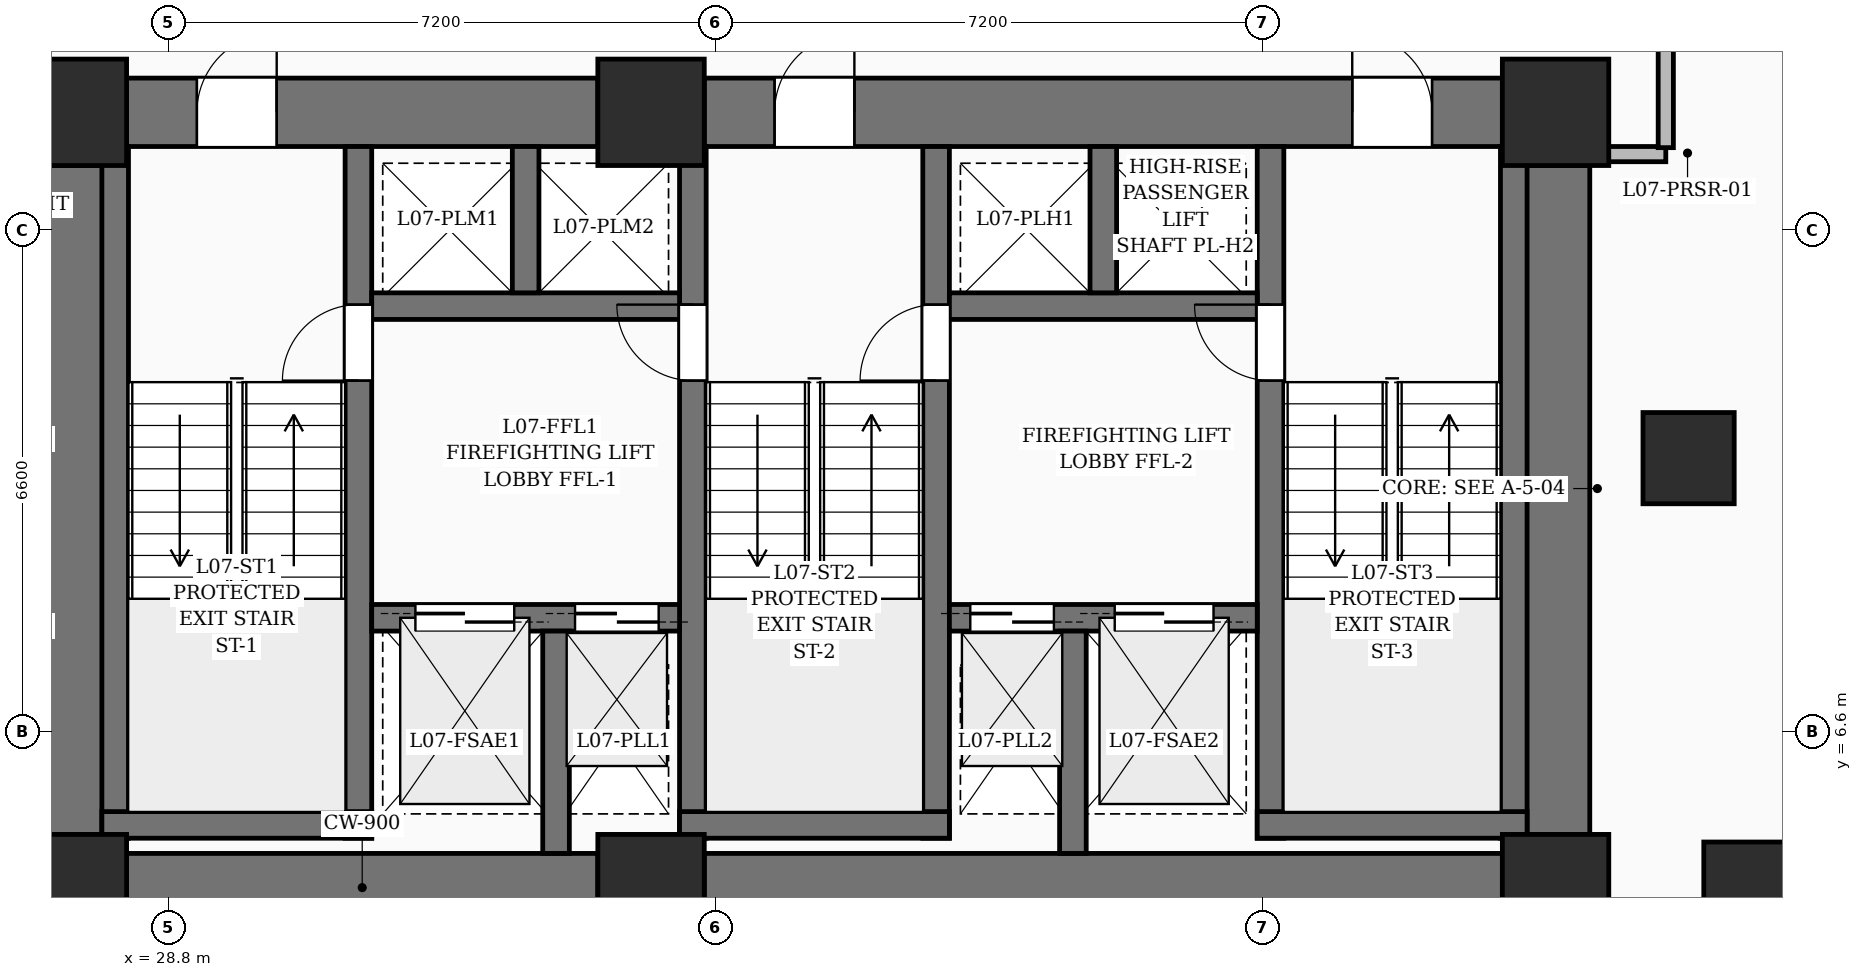
"""IFC4 building model, lengths in metres.
Left out: names, types, materials, properties, quantities, classifications, styles, units other than length and angle.
Written with IfcOpenShell. Run it as: python <this file> out.ifc"""

import sys

from ifc_helpers import new_model, si_unit, direction, frame, frame_2d, origin, origin_2d, place, context, subcontext, project, spatial, rectangle, extrude, element, fill, save


model = new_model("IFC4")
c1 = context("Model", 3, precision=1e-05, world=origin(), true_north=direction((0.0, 1.0)))
c2 = subcontext(c1, "Body", "Model", "MODEL_VIEW")
j1 = project(units=[si_unit("LENGTHUNIT", "METRE"), si_unit("PLANEANGLEUNIT", "RADIAN")], contexts=[c1])
p1 = place(None, origin())
s1 = spatial("IfcSite", under=j1, at=p1, CompositionType="ELEMENT")
p2 = place(p1, origin())
s2 = spatial("IfcBuilding", under=s1, at=p2, CompositionType="ELEMENT")
p3 = place(p2, frame((0.0, 0.0, 35.4)))
s3 = spatial("IfcBuildingStorey", under=s2, at=p3, CompositionType="ELEMENT", Elevation=35.4)
for number, where, z_axis, x_axis in (
    (1, (27.55, 4.55, 0.0), (0.0, 0.0, 1.0), (1.0, 0.0, 0.0)),
    (2, (35.15, 4.55, 0.0), (0.0, 0.0, 1.0), (1.0, 0.0, 0.0)),
    (3, (47.05, 4.55, 0.0), (0.0, 0.0, 1.0), (1.0, 0.0, 0.0)),
    (4, (27.55, 14.75, 0.0), (0.0, 0.0, 1.0), (1.0, 0.0, 0.0)),
    (5, (35.15, 14.75, 0.0), (0.0, 0.0, 1.0), (1.0, 0.0, 0.0)),
    (6, (47.05, 14.75, 0.0), (0.0, 0.0, 1.0), (1.0, 0.0, 0.0)),
):
    element("IfcColumn", number, at=place(p3, frame(where, z_axis=z_axis, x_axis=x_axis)), inside=s3, PredefinedType="COLUMN", context=c2, shape_type="SweptSolid", body=[
        extrude(rectangle(XDim=1.4, YDim=1.4, at=origin_2d()), origin(), (0.0, 0.0, 1.0), 3.6),
    ])
for number, where, z_axis, x_axis in (
    (7, (49.6, 4.55, 0.0), (0.0, 0.0, 1.0), (1.0, 0.0, 0.0)),
    (8, (48.8, 10.2, 0.0), (0.0, 0.0, 1.0), (1.0, 0.0, 0.0)),
):
    element("IfcColumn", number, at=place(p3, frame(where, z_axis=z_axis, x_axis=x_axis)), inside=s3, PredefinedType="COLUMN", context=c2, shape_type="SweptSolid", body=[
        extrude(rectangle(XDim=1.2, YDim=1.2, at=origin_2d()), origin(), (0.0, 0.0, 1.0), 3.6),
    ])
p4 = place(p3, frame((28.25, 4.55, 0.0), z_axis=(0.0, 0.0, 1.0), x_axis=(1.0, 0.0, 0.0)))
e9 = element("IfcWall", 9, at=p4, inside=s3, PredefinedType="SHEAR", context=c2, shape_type="SweptSolid", body=[
    extrude(rectangle(XDim=6.2, YDim=0.9, at=frame_2d((3.1, 0.0))), origin(), (0.0, 0.0, 1.0), 3.6),
])
p5 = place(p3, frame((35.85, 4.55, 0.0), z_axis=(0.0, 0.0, 1.0), x_axis=(1.0, 0.0, 0.0)))
e10 = element("IfcWall", 10, at=p5, inside=s3, PredefinedType="SHEAR", context=c2, shape_type="SweptSolid", body=[
    extrude(rectangle(XDim=10.5, YDim=0.9, at=frame_2d((5.25, 0.0))), origin(), (0.0, 0.0, 1.0), 3.6),
])
p6 = place(p3, frame((28.25, 14.75, 0.0), z_axis=(0.0, 0.0, 1.0), x_axis=(1.0, 0.0, 0.0)))
e11 = element("IfcWall", 11, at=p6, inside=s3, PredefinedType="SHEAR", context=c2, shape_type="SweptSolid", body=[
    extrude(rectangle(XDim=6.2, YDim=0.9, at=frame_2d((3.1, 0.0))), origin(), (0.0, 0.0, 1.0), 3.6),
])
p7 = place(p6, frame((0.925, 0.0, 0.0)))
e12 = element("IfcOpeningElement", 12, at=p7, cuts=e11, PredefinedType="OPENING", context=c2, shape_type="SweptSolid", body=[
    extrude(rectangle(XDim=1.05, YDim=2.15, at=frame_2d((0.525, 1.075))), frame((0.0, 0.46, 0.0), z_axis=(0.0, -1.0, 0.0), x_axis=(1.0, 0.0, 0.0)), (0.0, 0.0, 1.0), 0.92),
])
p8 = place(p3, frame((35.85, 14.75, 0.0), z_axis=(0.0, 0.0, 1.0), x_axis=(1.0, 0.0, 0.0)))
e13 = element("IfcWall", 13, at=p8, inside=s3, PredefinedType="SHEAR", context=c2, shape_type="SweptSolid", body=[
    extrude(rectangle(XDim=10.5, YDim=0.9, at=frame_2d((5.25, 0.0))), origin(), (0.0, 0.0, 1.0), 3.6),
])
p9 = place(p8, frame((0.925, 0.0, 0.0)))
e14 = element("IfcOpeningElement", 14, at=p9, cuts=e13, PredefinedType="OPENING", context=c2, shape_type="SweptSolid", body=[
    extrude(rectangle(XDim=1.05, YDim=2.15, at=frame_2d((0.525, 1.075))), frame((0.0, 0.46, 0.0), z_axis=(0.0, -1.0, 0.0), x_axis=(1.0, 0.0, 0.0)), (0.0, 0.0, 1.0), 0.92),
])
p10 = place(p8, frame((8.525, 0.0, 0.0)))
e15 = element("IfcOpeningElement", 15, at=p10, cuts=e13, PredefinedType="OPENING", context=c2, shape_type="SweptSolid", body=[
    extrude(rectangle(XDim=1.05, YDim=2.15, at=frame_2d((0.525, 1.075))), frame((0.0, 0.46, 0.0), z_axis=(0.0, -1.0, 0.0), x_axis=(1.0, 0.0, 0.0)), (0.0, 0.0, 1.0), 0.92),
])
for number, where, z_axis, x_axis in (
    (16, (27.55, 5.25, 0.0), (0.0, 0.0, 1.0), (0.0, 1.0, 0.0)),
    (17, (47.05, 5.25, 0.0), (0.0, 0.0, 1.0), (0.0, 1.0, 0.0)),
):
    element("IfcWall", number, at=place(p3, frame(where, z_axis=z_axis, x_axis=x_axis)), inside=s3, PredefinedType="SHEAR", context=c2, shape_type="SweptSolid", body=[
        extrude(rectangle(XDim=8.8, YDim=0.9, at=frame_2d((4.4, 0.0))), origin(), (0.0, 0.0, 1.0), 3.6),
    ])
p11 = place(p3, frame((28.1, 5.2, 0.0), z_axis=(0.0, 0.0, 1.0), x_axis=(0.0, 1.0, 0.0)))
e18 = element("IfcWall", 18, at=p11, inside=s3, PredefinedType="SOLIDWALL", context=c2, shape_type="SweptSolid", body=[
    extrude(rectangle(XDim=9.1, YDim=0.35, at=frame_2d((4.55, 0.0))), origin(), (0.0, 0.0, 1.0), 3.6),
])
p12 = place(p3, frame((31.3, 5.2, 0.0), z_axis=(0.0, 0.0, 1.0), x_axis=(0.0, 1.0, 0.0)))
e19 = element("IfcWall", 19, at=p12, inside=s3, PredefinedType="SOLIDWALL", context=c2, shape_type="SweptSolid", body=[
    extrude(rectangle(XDim=9.1, YDim=0.35, at=frame_2d((4.55, 0.0))), origin(), (0.0, 0.0, 1.0), 3.6),
])
p13 = place(p12, frame((6.02, 0.0, 0.0)))
e20 = element("IfcOpeningElement", 20, at=p13, cuts=e19, PredefinedType="OPENING", context=c2, shape_type="SweptSolid", body=[
    extrude(rectangle(XDim=1.0, YDim=2.15, at=frame_2d((0.5, 1.075))), frame((0.0, 0.185, 0.0), z_axis=(0.0, -1.0, 0.0), x_axis=(1.0, 0.0, 0.0)), (0.0, 0.0, 1.0), 0.37),
])
p14 = place(p3, frame((27.925, 5.375, 0.0), z_axis=(0.0, 0.0, 1.0), x_axis=(1.0, 0.0, 0.0)))
e21 = element("IfcWall", 21, at=p14, inside=s3, PredefinedType="SOLIDWALL", context=c2, shape_type="SweptSolid", body=[
    extrude(rectangle(XDim=3.55, YDim=0.35, at=frame_2d((1.775, 0.0))), origin(), (0.0, 0.0, 1.0), 3.6),
])
p15 = place(p3, frame((35.7, 5.2, 0.0), z_axis=(0.0, 0.0, 1.0), x_axis=(0.0, 1.0, 0.0)))
e22 = element("IfcWall", 22, at=p15, inside=s3, PredefinedType="SOLIDWALL", context=c2, shape_type="SweptSolid", body=[
    extrude(rectangle(XDim=9.1, YDim=0.35, at=frame_2d((4.55, 0.0))), origin(), (0.0, 0.0, 1.0), 3.6),
])
p16 = place(p15, frame((6.02, 0.0, 0.0)))
e23 = element("IfcOpeningElement", 23, at=p16, cuts=e22, PredefinedType="OPENING", context=c2, shape_type="SweptSolid", body=[
    extrude(rectangle(XDim=1.0, YDim=2.15, at=frame_2d((0.5, 1.075))), frame((0.0, 0.185, 0.0), z_axis=(0.0, -1.0, 0.0), x_axis=(1.0, 0.0, 0.0)), (0.0, 0.0, 1.0), 0.37),
])
p17 = place(p3, frame((38.9, 5.2, 0.0), z_axis=(0.0, 0.0, 1.0), x_axis=(0.0, 1.0, 0.0)))
e24 = element("IfcWall", 24, at=p17, inside=s3, PredefinedType="SOLIDWALL", context=c2, shape_type="SweptSolid", body=[
    extrude(rectangle(XDim=9.1, YDim=0.35, at=frame_2d((4.55, 0.0))), origin(), (0.0, 0.0, 1.0), 3.6),
])
p18 = place(p17, frame((6.02, 0.0, 0.0)))
e25 = element("IfcOpeningElement", 25, at=p18, cuts=e24, PredefinedType="OPENING", context=c2, shape_type="SweptSolid", body=[
    extrude(rectangle(XDim=1.0, YDim=2.15, at=frame_2d((0.5, 1.075))), frame((0.0, 0.185, 0.0), z_axis=(0.0, -1.0, 0.0), x_axis=(1.0, 0.0, 0.0)), (0.0, 0.0, 1.0), 0.37),
])
p19 = place(p3, frame((35.525, 5.375, 0.0), z_axis=(0.0, 0.0, 1.0), x_axis=(1.0, 0.0, 0.0)))
e26 = element("IfcWall", 26, at=p19, inside=s3, PredefinedType="SOLIDWALL", context=c2, shape_type="SweptSolid", body=[
    extrude(rectangle(XDim=3.55, YDim=0.35, at=frame_2d((1.775, 0.0))), origin(), (0.0, 0.0, 1.0), 3.6),
])
p20 = place(p3, frame((43.3, 5.2, 0.0), z_axis=(0.0, 0.0, 1.0), x_axis=(0.0, 1.0, 0.0)))
e27 = element("IfcWall", 27, at=p20, inside=s3, PredefinedType="SOLIDWALL", context=c2, shape_type="SweptSolid", body=[
    extrude(rectangle(XDim=9.1, YDim=0.35, at=frame_2d((4.55, 0.0))), origin(), (0.0, 0.0, 1.0), 3.6),
])
p21 = place(p20, frame((6.02, 0.0, 0.0)))
e28 = element("IfcOpeningElement", 28, at=p21, cuts=e27, PredefinedType="OPENING", context=c2, shape_type="SweptSolid", body=[
    extrude(rectangle(XDim=1.0, YDim=2.15, at=frame_2d((0.5, 1.075))), frame((0.0, 0.185, 0.0), z_axis=(0.0, -1.0, 0.0), x_axis=(1.0, 0.0, 0.0)), (0.0, 0.0, 1.0), 0.37),
])
p22 = place(p3, frame((46.5, 5.2, 0.0), z_axis=(0.0, 0.0, 1.0), x_axis=(0.0, 1.0, 0.0)))
e29 = element("IfcWall", 29, at=p22, inside=s3, PredefinedType="SOLIDWALL", context=c2, shape_type="SweptSolid", body=[
    extrude(rectangle(XDim=9.1, YDim=0.35, at=frame_2d((4.55, 0.0))), origin(), (0.0, 0.0, 1.0), 3.6),
])
p23 = place(p3, frame((43.125, 5.375, 0.0), z_axis=(0.0, 0.0, 1.0), x_axis=(1.0, 0.0, 0.0)))
e30 = element("IfcWall", 30, at=p23, inside=s3, PredefinedType="SOLIDWALL", context=c2, shape_type="SweptSolid", body=[
    extrude(rectangle(XDim=3.55, YDim=0.35, at=frame_2d((1.775, 0.0))), origin(), (0.0, 0.0, 1.0), 3.6),
])
p24 = place(p3, frame((31.475, 8.1, 0.0), z_axis=(0.0, 0.0, 1.0), x_axis=(1.0, 0.0, 0.0)))
e31 = element("IfcWall", 31, at=p24, inside=s3, PredefinedType="SOLIDWALL", context=c2, shape_type="SweptSolid", body=[
    extrude(rectangle(XDim=4.05, YDim=0.35, at=frame_2d((2.025, 0.0))), origin(), (0.0, 0.0, 1.0), 3.6),
])
p25 = place(p24, frame((0.575, 0.0, 0.0)))
e32 = element("IfcOpeningElement", 32, at=p25, cuts=e31, PredefinedType="OPENING", context=c2, shape_type="SweptSolid", body=[
    extrude(rectangle(XDim=1.3, YDim=2.25, at=frame_2d((0.65, 1.125))), frame((0.0, 0.185, 0.0), z_axis=(0.0, -1.0, 0.0), x_axis=(1.0, 0.0, 0.0)), (0.0, 0.0, 1.0), 0.37),
])
p26 = place(p24, frame((2.675, 0.0, 0.0)))
e33 = element("IfcOpeningElement", 33, at=p26, cuts=e31, PredefinedType="OPENING", context=c2, shape_type="SweptSolid", body=[
    extrude(rectangle(XDim=1.1, YDim=2.2, at=frame_2d((0.55, 1.1))), frame((0.0, 0.185, 0.0), z_axis=(0.0, -1.0, 0.0), x_axis=(1.0, 0.0, 0.0)), (0.0, 0.0, 1.0), 0.37),
])
p27 = place(p3, frame((39.075, 8.1, 0.0), z_axis=(0.0, 0.0, 1.0), x_axis=(1.0, 0.0, 0.0)))
e34 = element("IfcWall", 34, at=p27, inside=s3, PredefinedType="SOLIDWALL", context=c2, shape_type="SweptSolid", body=[
    extrude(rectangle(XDim=4.05, YDim=0.35, at=frame_2d((2.025, 0.0))), origin(), (0.0, 0.0, 1.0), 3.6),
])
p28 = place(p27, frame((2.175, 0.0, 0.0)))
e35 = element("IfcOpeningElement", 35, at=p28, cuts=e34, PredefinedType="OPENING", context=c2, shape_type="SweptSolid", body=[
    extrude(rectangle(XDim=1.3, YDim=2.25, at=frame_2d((0.65, 1.125))), frame((0.0, 0.185, 0.0), z_axis=(0.0, -1.0, 0.0), x_axis=(1.0, 0.0, 0.0)), (0.0, 0.0, 1.0), 0.37),
])
p29 = place(p27, frame((0.275, 0.0, 0.0)))
e36 = element("IfcOpeningElement", 36, at=p29, cuts=e34, PredefinedType="OPENING", context=c2, shape_type="SweptSolid", body=[
    extrude(rectangle(XDim=1.1, YDim=2.2, at=frame_2d((0.55, 1.1))), frame((0.0, 0.185, 0.0), z_axis=(0.0, -1.0, 0.0), x_axis=(1.0, 0.0, 0.0)), (0.0, 0.0, 1.0), 0.37),
])
for number, where, z_axis, x_axis in (
    (37, (33.9, 5.0, 0.0), (0.0, 0.0, 1.0), (0.0, 1.0, 0.0)),
    (38, (40.7, 5.0, 0.0), (0.0, 0.0, 1.0), (0.0, 1.0, 0.0)),
):
    element("IfcWall", number, at=place(p3, frame(where, z_axis=z_axis, x_axis=x_axis)), inside=s3, PredefinedType="SOLIDWALL", context=c2, shape_type="SweptSolid", body=[
        extrude(rectangle(XDim=2.925, YDim=0.35, at=frame_2d((1.462, 0.0))), origin(), (0.0, 0.0, 1.0), 3.6),
    ])
p30 = place(p3, frame((31.475, 12.2, 0.0), z_axis=(0.0, 0.0, 1.0), x_axis=(1.0, 0.0, 0.0)))
e39 = element("IfcWall", 39, at=p30, inside=s3, PredefinedType="SOLIDWALL", context=c2, shape_type="SweptSolid", body=[
    extrude(rectangle(XDim=4.05, YDim=0.35, at=frame_2d((2.025, 0.0))), origin(), (0.0, 0.0, 1.0), 3.6),
])
p31 = place(p3, frame((33.5, 12.375, 0.0), z_axis=(0.0, 0.0, 1.0), x_axis=(0.0, 1.0, 0.0)))
e40 = element("IfcWall", 40, at=p31, inside=s3, PredefinedType="SOLIDWALL", context=c2, shape_type="SweptSolid", body=[
    extrude(rectangle(XDim=1.925, YDim=0.35, at=frame_2d((0.962, 0.0))), origin(), (0.0, 0.0, 1.0), 3.6),
])
p32 = place(p3, frame((39.075, 12.2, 0.0), z_axis=(0.0, 0.0, 1.0), x_axis=(1.0, 0.0, 0.0)))
e41 = element("IfcWall", 41, at=p32, inside=s3, PredefinedType="SOLIDWALL", context=c2, shape_type="SweptSolid", body=[
    extrude(rectangle(XDim=4.05, YDim=0.35, at=frame_2d((2.025, 0.0))), origin(), (0.0, 0.0, 1.0), 3.6),
])
p33 = place(p3, frame((41.1, 12.375, 0.0), z_axis=(0.0, 0.0, 1.0), x_axis=(0.0, 1.0, 0.0)))
e42 = element("IfcWall", 42, at=p33, inside=s3, PredefinedType="SOLIDWALL", context=c2, shape_type="SweptSolid", body=[
    extrude(rectangle(XDim=1.925, YDim=0.35, at=frame_2d((0.962, 0.0))), origin(), (0.0, 0.0, 1.0), 3.6),
])
p34 = place(p3, frame((47.5, 14.2, 0.0), z_axis=(0.0, 0.0, 1.0), x_axis=(1.0, 0.0, 0.0)))
e43 = element("IfcWall", 43, at=p34, inside=s3, PredefinedType="PARTITIONING", context=c2, shape_type="SweptSolid", body=[
    extrude(rectangle(XDim=1.0, YDim=0.2, at=frame_2d((0.5, 0.0))), origin(), (0.0, 0.0, 1.0), 3.35),
])
p35 = place(p3, frame((48.5, 14.285, 0.0), z_axis=(0.0, 0.0, 1.0), x_axis=(0.0, 1.0, 0.0)))
e44 = element("IfcWall", 44, at=p35, inside=s3, PredefinedType="PARTITIONING", context=c2, shape_type="SweptSolid", body=[
    extrude(rectangle(XDim=3.38, YDim=0.2, at=frame_2d((1.69, 0.0))), origin(), (0.0, 0.0, 1.0), 2.228),
])
p36 = place(p7, origin())
e45 = element("IfcDoor", 45, at=p36, inside=s3, OperationType="SINGLE_SWING_RIGHT", PredefinedType="DOOR", context=c2, shape_type="SweptSolid", body=[
    extrude(rectangle(XDim=1.05, YDim=2.15, at=frame_2d((0.525, 1.075))), frame((0.0, 0.025, 0.0), z_axis=(0.0, -1.0, 0.0), x_axis=(1.0, 0.0, 0.0)), (0.0, 0.0, 1.0), 0.05),
])
fill(e12, e45)
p37 = place(p9, origin())
e46 = element("IfcDoor", 46, at=p37, inside=s3, OperationType="SINGLE_SWING_RIGHT", PredefinedType="DOOR", context=c2, shape_type="SweptSolid", body=[
    extrude(rectangle(XDim=1.05, YDim=2.15, at=frame_2d((0.525, 1.075))), frame((0.0, 0.025, 0.0), z_axis=(0.0, -1.0, 0.0), x_axis=(1.0, 0.0, 0.0)), (0.0, 0.0, 1.0), 0.05),
])
fill(e14, e46)
p38 = place(p10, origin())
e47 = element("IfcDoor", 47, at=p38, inside=s3, OperationType="SINGLE_SWING_LEFT", PredefinedType="DOOR", context=c2, shape_type="SweptSolid", body=[
    extrude(rectangle(XDim=1.05, YDim=2.15, at=frame_2d((0.525, 1.075))), frame((0.0, 0.025, 0.0), z_axis=(0.0, -1.0, 0.0), x_axis=(1.0, 0.0, 0.0)), (0.0, 0.0, 1.0), 0.05),
])
fill(e15, e47)
p39 = place(p13, origin())
e48 = element("IfcDoor", 48, at=p39, inside=s3, OperationType="SINGLE_SWING_LEFT", PredefinedType="DOOR", context=c2, shape_type="SweptSolid", body=[
    extrude(rectangle(XDim=1.0, YDim=2.15, at=frame_2d((0.5, 1.075))), frame((0.0, 0.025, 0.0), z_axis=(0.0, -1.0, 0.0), x_axis=(1.0, 0.0, 0.0)), (0.0, 0.0, 1.0), 0.05),
])
fill(e20, e48)
p40 = place(p16, origin())
e49 = element("IfcDoor", 49, at=p40, inside=s3, OperationType="SINGLE_SWING_RIGHT", PredefinedType="DOOR", context=c2, shape_type="SweptSolid", body=[
    extrude(rectangle(XDim=1.0, YDim=2.15, at=frame_2d((0.5, 1.075))), frame((0.0, 0.025, 0.0), z_axis=(0.0, -1.0, 0.0), x_axis=(1.0, 0.0, 0.0)), (0.0, 0.0, 1.0), 0.05),
])
fill(e23, e49)
p41 = place(p18, origin())
e50 = element("IfcDoor", 50, at=p41, inside=s3, OperationType="SINGLE_SWING_LEFT", PredefinedType="DOOR", context=c2, shape_type="SweptSolid", body=[
    extrude(rectangle(XDim=1.0, YDim=2.15, at=frame_2d((0.5, 1.075))), frame((0.0, 0.025, 0.0), z_axis=(0.0, -1.0, 0.0), x_axis=(1.0, 0.0, 0.0)), (0.0, 0.0, 1.0), 0.05),
])
fill(e25, e50)
p42 = place(p21, origin())
e51 = element("IfcDoor", 51, at=p42, inside=s3, OperationType="SINGLE_SWING_RIGHT", PredefinedType="DOOR", context=c2, shape_type="SweptSolid", body=[
    extrude(rectangle(XDim=1.0, YDim=2.15, at=frame_2d((0.5, 1.075))), frame((0.0, 0.025, 0.0), z_axis=(0.0, -1.0, 0.0), x_axis=(1.0, 0.0, 0.0)), (0.0, 0.0, 1.0), 0.05),
])
fill(e28, e51)
p43 = place(p25, origin())
e52 = element("IfcDoor", 52, at=p43, inside=s3, OperationType="DOUBLE_DOOR_SLIDING", PredefinedType="DOOR", context=c2, shape_type="SweptSolid", body=[
    extrude(rectangle(XDim=1.3, YDim=2.25, at=frame_2d((0.65, 1.125))), frame((0.0, 0.025, 0.0), z_axis=(0.0, -1.0, 0.0), x_axis=(1.0, 0.0, 0.0)), (0.0, 0.0, 1.0), 0.05),
])
fill(e32, e52)
p44 = place(p28, origin())
e53 = element("IfcDoor", 53, at=p44, inside=s3, OperationType="DOUBLE_DOOR_SLIDING", PredefinedType="DOOR", context=c2, shape_type="SweptSolid", body=[
    extrude(rectangle(XDim=1.3, YDim=2.25, at=frame_2d((0.65, 1.125))), frame((0.0, 0.025, 0.0), z_axis=(0.0, -1.0, 0.0), x_axis=(1.0, 0.0, 0.0)), (0.0, 0.0, 1.0), 0.05),
])
fill(e35, e53)
p45 = place(p26, origin())
e54 = element("IfcDoor", 54, at=p45, inside=s3, OperationType="DOUBLE_DOOR_SLIDING", PredefinedType="DOOR", context=c2, shape_type="SweptSolid", body=[
    extrude(rectangle(XDim=1.1, YDim=2.2, at=frame_2d((0.55, 1.1))), frame((0.0, 0.025, 0.0), z_axis=(0.0, -1.0, 0.0), x_axis=(1.0, 0.0, 0.0)), (0.0, 0.0, 1.0), 0.05),
])
fill(e33, e54)
p46 = place(p29, origin())
e55 = element("IfcDoor", 55, at=p46, inside=s3, OperationType="DOUBLE_DOOR_SLIDING", PredefinedType="DOOR", context=c2, shape_type="SweptSolid", body=[
    extrude(rectangle(XDim=1.1, YDim=2.2, at=frame_2d((0.55, 1.1))), frame((0.0, 0.025, 0.0), z_axis=(0.0, -1.0, 0.0), x_axis=(1.0, 0.0, 0.0)), (0.0, 0.0, 1.0), 0.05),
])
fill(e36, e55)
save(model, sys.argv[1])
